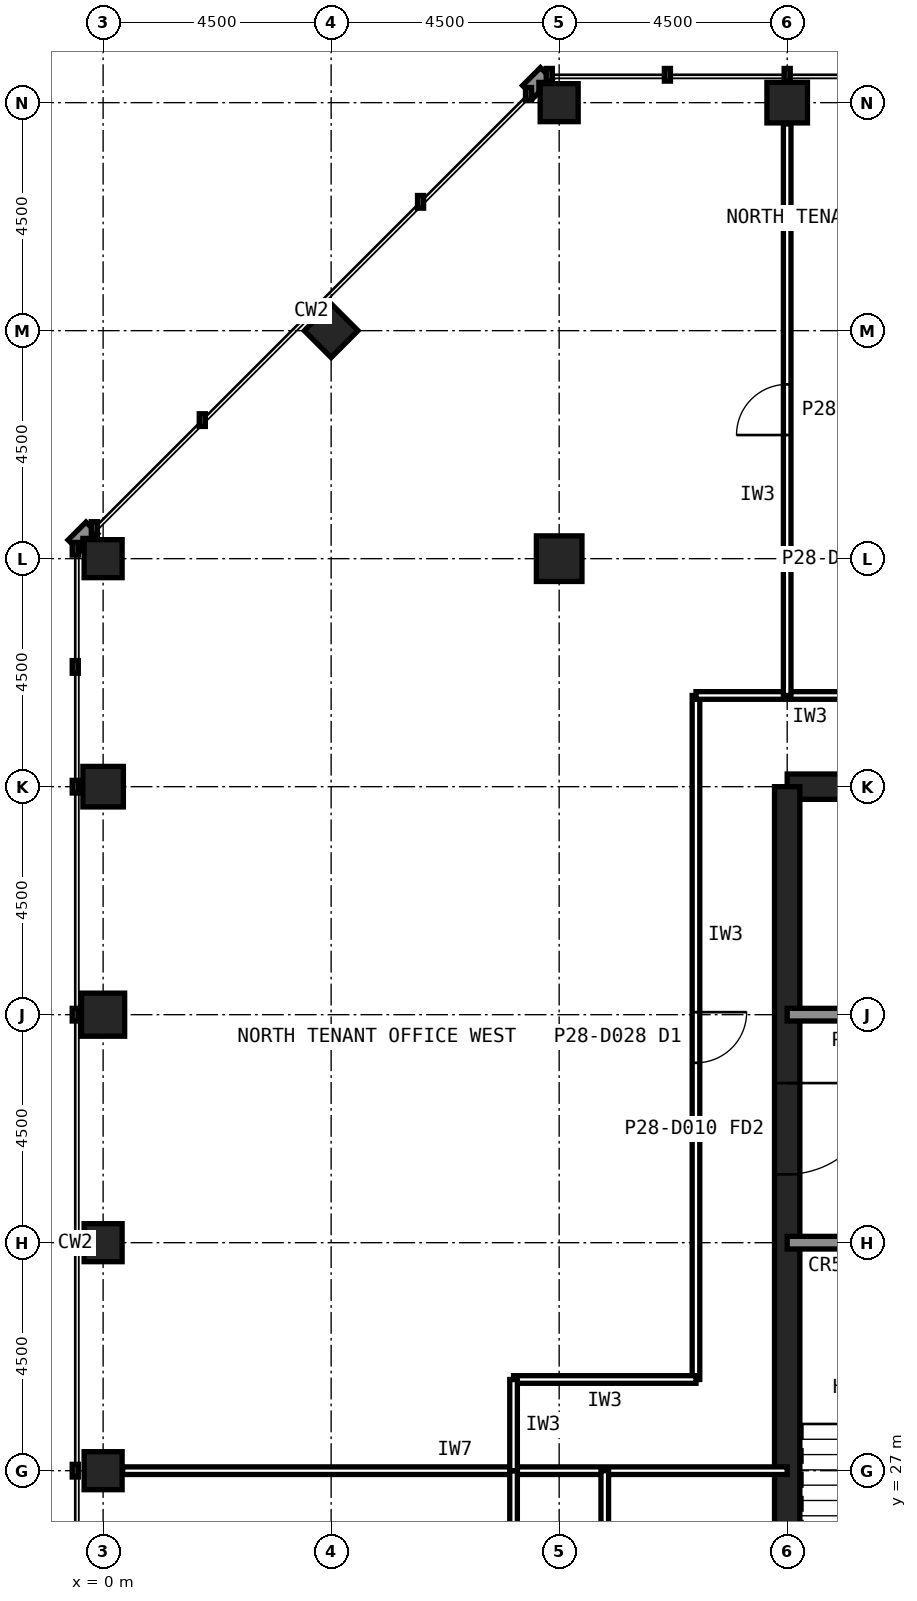
"""IFC4 building model, lengths in metres.
Left out: names, types, materials, properties, quantities, classifications, styles, units other than length and angle.
Written with IfcOpenShell. Run it as: python <this file> out.ifc"""

import sys

from ifc_helpers import new_model, si_unit, direction, frame, frame_2d, origin, origin_2d, place, context, subcontext, project, spatial, rectangle, hollow_rectangle, extrude, element, fill, save


model = new_model("IFC4")
c1 = context("Model", 3, precision=1e-05, world=origin(), true_north=direction((0.0, 1.0)))
c2 = subcontext(c1, "Body", "Model", "MODEL_VIEW")
j1 = project(units=[si_unit("LENGTHUNIT", "METRE"), si_unit("PLANEANGLEUNIT", "RADIAN")], contexts=[c1])
p1 = place(None, origin())
s1 = spatial("IfcSite", under=j1, at=p1, CompositionType="ELEMENT")
p2 = place(p1, origin())
s2 = spatial("IfcBuilding", under=s1, at=p2, CompositionType="ELEMENT")
p3 = place(p2, frame((0.0, 0.0, 119.6)))
s3 = spatial("IfcBuildingStorey", under=s2, at=p3, CompositionType="ELEMENT", Elevation=119.6)
p4 = place(p3, frame((13.5, 54.0, 0.0), z_axis=(0.0, 0.0, 1.0), x_axis=(1.0, 0.0, 0.0)))
e1 = element("IfcColumn", 1, at=p4, inside=s3, PredefinedType="COLUMN", context=c2, shape_type="SweptSolid", body=[
    extrude(hollow_rectangle(XDim=0.8, YDim=0.8, WallThickness=0.045, at=origin_2d()), origin(), (0.0, 0.0, 1.0), 4.0),
])
for number, where, z_axis, x_axis in (
    (2, (9.0, 54.0, 0.0), (0.0, 0.0, 1.0), (1.0, 0.0, 0.0)),
    (3, (0.0, 45.0, 0.0), (0.0, 0.0, 1.0), (1.0, 0.0, 0.0)),
):
    element("IfcColumn", number, at=place(p3, frame(where, z_axis=z_axis, x_axis=x_axis)), inside=s3, PredefinedType="COLUMN", context=c2, shape_type="SweptSolid", body=[
        extrude(hollow_rectangle(XDim=0.75, YDim=0.75, WallThickness=0.04, at=origin_2d()), origin(), (0.0, 0.0, 1.0), 4.0),
    ])
p5 = place(p3, frame((0.0, 40.5, 0.0), z_axis=(0.0, 0.0, 1.0), x_axis=(1.0, 0.0, 0.0)))
e4 = element("IfcColumn", 4, at=p5, inside=s3, PredefinedType="COLUMN", context=c2, shape_type="SweptSolid", body=[
    extrude(hollow_rectangle(XDim=0.8, YDim=0.8, WallThickness=0.045, at=origin_2d()), origin(), (0.0, 0.0, 1.0), 4.0),
])
p6 = place(p3, frame((0.0, 36.0, 0.0), z_axis=(0.0, 0.0, 1.0), x_axis=(1.0, 0.0, 0.0)))
e5 = element("IfcColumn", 5, at=p6, inside=s3, PredefinedType="COLUMN", context=c2, shape_type="SweptSolid", body=[
    extrude(hollow_rectangle(XDim=0.85, YDim=0.85, WallThickness=0.05, at=origin_2d()), origin(), (0.0, 0.0, 1.0), 4.0),
])
for number, where, z_axis, x_axis in (
    (6, (0.0, 31.5, 0.0), (0.0, 0.0, 1.0), (1.0, 0.0, 0.0)),
    (7, (0.0, 27.0, 0.0), (0.0, 0.0, 1.0), (1.0, 0.0, 0.0)),
    (8, (4.5, 49.5, 0.0), (0.0, 0.0, 1.0), (0.707, 0.707, 0.0)),
):
    element("IfcColumn", number, at=place(p3, frame(where, z_axis=z_axis, x_axis=x_axis)), inside=s3, PredefinedType="COLUMN", context=c2, shape_type="SweptSolid", body=[
        extrude(hollow_rectangle(XDim=0.75, YDim=0.75, WallThickness=0.04, at=origin_2d()), origin(), (0.0, 0.0, 1.0), 4.0),
    ])
p7 = place(p3, frame((9.0, 45.0, 0.0), z_axis=(0.0, 0.0, 1.0), x_axis=(1.0, 0.0, 0.0)))
e9 = element("IfcColumn", 9, at=p7, inside=s3, PredefinedType="COLUMN", context=c2, shape_type="SweptSolid", body=[
    extrude(hollow_rectangle(XDim=0.9, YDim=0.9, WallThickness=0.063, at=origin_2d()), origin(), (0.0, 0.0, 1.0), 4.0),
])
p8 = place(p3, frame((40.5, 40.5, 0.0), z_axis=(0.0, 0.0, 1.0), x_axis=(-1.0, 0.0, 0.0)))
e10 = element("IfcWall", 10, at=p8, inside=s3, PredefinedType="SHEAR", context=c2, shape_type="SweptSolid", body=[
    extrude(rectangle(XDim=27.0, YDim=0.5, at=frame_2d((13.5, 0.0))), origin(), (0.0, 0.0, 1.0), 4.0),
])
p9 = place(p3, frame((13.5, 40.5, 0.0), z_axis=(0.0, 0.0, 1.0), x_axis=(0.0, -1.0, 0.0)))
e11 = element("IfcWall", 11, at=p9, inside=s3, PredefinedType="SHEAR", context=c2, shape_type="SweptSolid", body=[
    extrude(rectangle(XDim=27.0, YDim=0.5, at=frame_2d((13.5, 0.0))), origin(), (0.0, 0.0, 1.0), 4.0),
])
p10 = place(p9, frame((19.65, 0.0, 0.0)))
e12 = element("IfcOpeningElement", 12, at=p10, cuts=e11, PredefinedType="OPENING", context=c2, shape_type="SweptSolid", body=[
    extrude(rectangle(XDim=1.2, YDim=2.1, at=frame_2d((0.6, 1.05))), frame((0.0, 0.26, 0.0), z_axis=(0.0, -1.0, 0.0), x_axis=(1.0, 0.0, 0.0)), (0.0, 0.0, 1.0), 0.52),
])
p11 = place(p9, frame((5.85, 0.0, 0.0)))
e13 = element("IfcOpeningElement", 13, at=p11, cuts=e11, PredefinedType="OPENING", context=c2, shape_type="SweptSolid", body=[
    extrude(rectangle(XDim=1.8, YDim=2.1, at=frame_2d((0.9, 1.05))), frame((0.0, 0.26, 0.0), z_axis=(0.0, -1.0, 0.0), x_axis=(1.0, 0.0, 0.0)), (0.0, 0.0, 1.0), 0.52),
])
p12 = place(p3, frame((13.5, 36.0, 0.0), z_axis=(0.0, 0.0, 1.0), x_axis=(1.0, 0.0, 0.0)))
e14 = element("IfcWall", 14, at=p12, inside=s3, PredefinedType="SOLIDWALL", context=c2, shape_type="SweptSolid", body=[
    extrude(rectangle(XDim=27.0, YDim=0.25, at=frame_2d((13.5, 0.0))), origin(), (0.0, 0.0, 1.0), 3.84),
])
p13 = place(p12, frame((1.8, 0.0, 0.0)))
e15 = element("IfcOpeningElement", 15, at=p13, cuts=e14, PredefinedType="OPENING", context=c2, shape_type="SweptSolid", body=[
    extrude(rectangle(XDim=0.9, YDim=2.1, at=frame_2d((0.45, 1.05))), frame((0.0, 0.135, 0.0), z_axis=(0.0, -1.0, 0.0), x_axis=(1.0, 0.0, 0.0)), (0.0, 0.0, 1.0), 0.27),
])
p14 = place(p12, frame((5.55, 0.0, 0.0)))
e16 = element("IfcOpeningElement", 16, at=p14, cuts=e14, PredefinedType="OPENING", context=c2, shape_type="SweptSolid", body=[
    extrude(rectangle(XDim=0.9, YDim=2.1, at=frame_2d((0.45, 1.05))), frame((0.0, 0.135, 0.0), z_axis=(0.0, -1.0, 0.0), x_axis=(1.0, 0.0, 0.0)), (0.0, 0.0, 1.0), 0.27),
])
p15 = place(p12, frame((8.55, 0.0, 0.0)))
e17 = element("IfcOpeningElement", 17, at=p15, cuts=e14, PredefinedType="OPENING", context=c2, shape_type="SweptSolid", body=[
    extrude(rectangle(XDim=0.9, YDim=2.1, at=frame_2d((0.45, 1.05))), frame((0.0, 0.135, 0.0), z_axis=(0.0, -1.0, 0.0), x_axis=(1.0, 0.0, 0.0)), (0.0, 0.0, 1.0), 0.27),
])
p16 = place(p12, frame((24.1, 0.0, 0.0)))
e18 = element("IfcOpeningElement", 18, at=p16, cuts=e14, PredefinedType="OPENING", context=c2, shape_type="SweptSolid", body=[
    extrude(rectangle(XDim=1.3, YDim=2.2, at=frame_2d((0.65, 1.1))), frame((0.0, 0.135, 0.0), z_axis=(0.0, -1.0, 0.0), x_axis=(1.0, 0.0, 0.0)), (0.0, 0.0, 1.0), 0.27),
])
p17 = place(p3, frame((13.5, 31.5, 0.0), z_axis=(0.0, 0.0, 1.0), x_axis=(1.0, 0.0, 0.0)))
e19 = element("IfcWall", 19, at=p17, inside=s3, PredefinedType="SOLIDWALL", context=c2, shape_type="SweptSolid", body=[
    extrude(rectangle(XDim=27.0, YDim=0.25, at=frame_2d((13.5, 0.0))), origin(), (0.0, 0.0, 1.0), 3.84),
])
p18 = place(p17, frame((24.15, 0.0, 0.0)))
e20 = element("IfcOpeningElement", 20, at=p18, cuts=e19, PredefinedType="OPENING", context=c2, shape_type="SweptSolid", body=[
    extrude(rectangle(XDim=1.2, YDim=2.1, at=frame_2d((0.6, 1.05))), frame((0.0, 0.135, 0.0), z_axis=(0.0, -1.0, 0.0), x_axis=(1.0, 0.0, 0.0)), (0.0, 0.0, 1.0), 0.27),
])
p19 = place(p17, frame((15.3, 0.0, 0.0)))
e21 = element("IfcOpeningElement", 21, at=p19, cuts=e19, PredefinedType="OPENING", context=c2, shape_type="SweptSolid", body=[
    extrude(rectangle(XDim=0.9, YDim=2.1, at=frame_2d((0.45, 1.05))), frame((0.0, 0.135, 0.0), z_axis=(0.0, -1.0, 0.0), x_axis=(1.0, 0.0, 0.0)), (0.0, 0.0, 1.0), 0.27),
])
p20 = place(p17, frame((19.8, 0.0, 0.0)))
e22 = element("IfcOpeningElement", 22, at=p20, cuts=e19, PredefinedType="OPENING", context=c2, shape_type="SweptSolid", body=[
    extrude(rectangle(XDim=0.9, YDim=2.1, at=frame_2d((0.45, 1.05))), frame((0.0, 0.135, 0.0), z_axis=(0.0, -1.0, 0.0), x_axis=(1.0, 0.0, 0.0)), (0.0, 0.0, 1.0), 0.27),
])
p21 = place(p3, frame((0.385, 27.0, 0.0), z_axis=(0.0, 0.0, 1.0), x_axis=(1.0, 0.0, 0.0)))
e23 = element("IfcWall", 23, at=p21, inside=s3, PredefinedType="PARTITIONING", context=c2, shape_type="SweptSolid", body=[
    extrude(rectangle(XDim=13.115, YDim=0.15, at=frame_2d((6.558, 0.0))), origin(), (0.0, 0.0, 1.0), 2.989),
])
p22 = place(p3, frame((8.1, 27.0, 0.0), z_axis=(0.0, 0.0, 1.0), x_axis=(0.0, -1.0, 0.0)))
e24 = element("IfcWall", 24, at=p22, inside=s3, PredefinedType="PARTITIONING", context=c2, shape_type="SweptSolid", body=[
    extrude(rectangle(XDim=6.3, YDim=0.15, at=frame_2d((3.15, 0.0))), origin(), (0.0, 0.0, 1.0), 3.84),
])
p23 = place(p3, frame((11.7, 42.3, 0.0), z_axis=(0.0, 0.0, 1.0), x_axis=(0.0, -1.0, 0.0)))
e25 = element("IfcWall", 25, at=p23, inside=s3, PredefinedType="PARTITIONING", context=c2, shape_type="SweptSolid", body=[
    extrude(rectangle(XDim=13.5, YDim=0.15, at=frame_2d((6.75, 0.0))), origin(), (0.0, 0.0, 1.0), 3.84),
])
p24 = place(p23, frame((6.25, 0.0, 0.0)))
e26 = element("IfcOpeningElement", 26, at=p24, cuts=e25, PredefinedType="OPENING", context=c2, shape_type="SweptSolid", body=[
    extrude(rectangle(XDim=1.0, YDim=2.1, at=frame_2d((0.5, 1.05))), frame((0.0, 0.085, 0.0), z_axis=(0.0, -1.0, 0.0), x_axis=(1.0, 0.0, 0.0)), (0.0, 0.0, 1.0), 0.17),
])
p25 = place(p3, frame((16.2, 42.3, 0.0), z_axis=(0.0, 0.0, 1.0), x_axis=(-1.0, 0.0, 0.0)))
e27 = element("IfcWall", 27, at=p25, inside=s3, PredefinedType="PARTITIONING", context=c2, shape_type="SweptSolid", body=[
    extrude(rectangle(XDim=4.5, YDim=0.15, at=frame_2d((2.25, 0.0))), origin(), (0.0, 0.0, 1.0), 3.84),
])
p26 = place(p3, frame((11.7, 28.8, 0.0), z_axis=(0.0, 0.0, 1.0), x_axis=(-1.0, 0.0, 0.0)))
e28 = element("IfcWall", 28, at=p26, inside=s3, PredefinedType="PARTITIONING", context=c2, shape_type="SweptSolid", body=[
    extrude(rectangle(XDim=3.6, YDim=0.15, at=frame_2d((1.8, 0.0))), origin(), (0.0, 0.0, 1.0), 3.84),
])
p27 = place(p3, frame((8.1, 28.8, 0.0), z_axis=(0.0, 0.0, 1.0), x_axis=(0.0, -1.0, 0.0)))
e29 = element("IfcWall", 29, at=p27, inside=s3, PredefinedType="PARTITIONING", context=c2, shape_type="SweptSolid", body=[
    extrude(rectangle(XDim=1.8, YDim=0.15, at=frame_2d((0.9, 0.0))), origin(), (0.0, 0.0, 1.0), 3.84),
])
p28 = place(p3, frame((9.9, 27.0, 0.0), z_axis=(0.0, 0.0, 1.0), x_axis=(0.0, -1.0, 0.0)))
e30 = element("IfcWall", 30, at=p28, inside=s3, PredefinedType="PARTITIONING", context=c2, shape_type="SweptSolid", body=[
    extrude(rectangle(XDim=4.5, YDim=0.15, at=frame_2d((2.25, 0.0))), origin(), (0.0, 0.0, 1.0), 3.84),
])
p29 = place(p3, frame((13.5, 42.3, 0.0), z_axis=(0.0, 0.0, 1.0), x_axis=(0.0, 1.0, 0.0)))
e31 = element("IfcWall", 31, at=p29, inside=s3, PredefinedType="PARTITIONING", context=c2, shape_type="SweptSolid", body=[
    extrude(rectangle(XDim=11.28, YDim=0.15, at=frame_2d((5.64, 0.0))), origin(), (0.0, 0.0, 1.0), 2.989),
])
p30 = place(p29, frame((5.14, 0.0, 0.0)))
e32 = element("IfcOpeningElement", 32, at=p30, cuts=e31, PredefinedType="OPENING", context=c2, shape_type="SweptSolid", body=[
    extrude(rectangle(XDim=1.0, YDim=2.1, at=frame_2d((0.5, 1.05))), frame((0.0, 0.085, 0.0), z_axis=(0.0, -1.0, 0.0), x_axis=(1.0, 0.0, 0.0)), (0.0, 0.0, 1.0), 0.17),
])
p31 = place(p11, origin())
e33 = element("IfcDoor", 33, at=p31, inside=s3, OperationType="SINGLE_SWING_LEFT", PredefinedType="DOOR", context=c2, shape_type="SweptSolid", body=[
    extrude(rectangle(XDim=1.8, YDim=2.1, at=frame_2d((0.9, 1.05))), frame((0.0, 0.025, 0.0), z_axis=(0.0, -1.0, 0.0), x_axis=(1.0, 0.0, 0.0)), (0.0, 0.0, 1.0), 0.05),
])
fill(e13, e33)
p32 = place(p24, origin())
e34 = element("IfcDoor", 34, at=p32, inside=s3, OperationType="SINGLE_SWING_LEFT", PredefinedType="DOOR", context=c2, shape_type="SweptSolid", body=[
    extrude(rectangle(XDim=1.0, YDim=2.1, at=frame_2d((0.5, 1.05))), frame((0.0, 0.025, 0.0), z_axis=(0.0, -1.0, 0.0), x_axis=(1.0, 0.0, 0.0)), (0.0, 0.0, 1.0), 0.05),
])
fill(e26, e34)
p33 = place(p30, origin())
e35 = element("IfcDoor", 35, at=p33, inside=s3, OperationType="SINGLE_SWING_LEFT", PredefinedType="DOOR", context=c2, shape_type="SweptSolid", body=[
    extrude(rectangle(XDim=1.0, YDim=2.1, at=frame_2d((0.5, 1.05))), frame((0.0, 0.025, 0.0), z_axis=(0.0, -1.0, 0.0), x_axis=(1.0, 0.0, 0.0)), (0.0, 0.0, 1.0), 0.05),
])
fill(e32, e35)
save(model, sys.argv[1])
